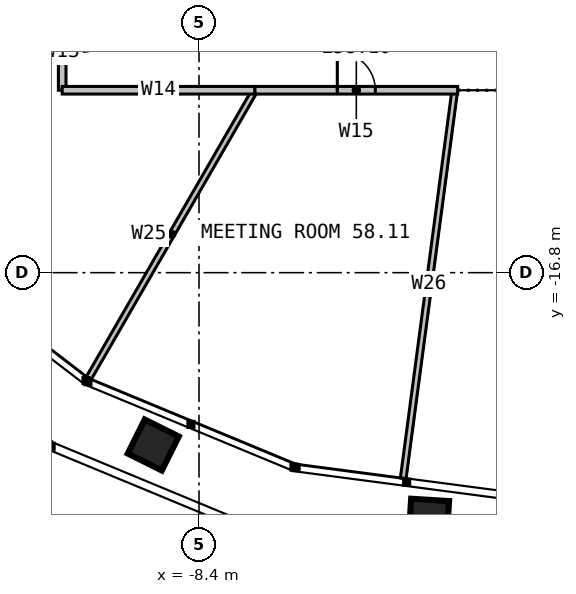
"""IFC4 building model, lengths in metres.
Left out: names, types, materials, properties, quantities, classifications, styles, units other than length and angle.
Written with IfcOpenShell. Run it as: python <this file> out.ifc"""

import sys

from ifc_helpers import new_model, si_unit, direction, frame, frame_2d, origin, place, context, subcontext, project, spatial, rectangle, extrude, element, fill, save


model = new_model("IFC4")
c1 = context("Model", 3, precision=1e-05, world=origin(), true_north=direction((0.0, 1.0)))
c2 = subcontext(c1, "Body", "Model", "MODEL_VIEW")
j1 = project(units=[si_unit("LENGTHUNIT", "METRE"), si_unit("PLANEANGLEUNIT", "RADIAN")], contexts=[c1])
p1 = place(None, origin())
s1 = spatial("IfcSite", under=j1, at=p1, CompositionType="ELEMENT")
p2 = place(p1, origin())
s2 = spatial("IfcBuilding", under=s1, at=p2, CompositionType="ELEMENT")
p3 = place(p2, frame((0.0, 0.0, 240.0)))
s3 = spatial("IfcBuildingStorey", under=s2, at=p3, CompositionType="ELEMENT", Elevation=240.0)
p4 = place(p3, frame((-6.928, -12.0, 0.0), z_axis=(0.0, 0.0, 1.0), x_axis=(-0.500008971228, -0.866020224182, 0.0)))
e1 = element("IfcWall", 1, at=p4, inside=s3, PredefinedType="PARTITIONING", context=c2, shape_type="SweptSolid", body=[
    extrude(rectangle(XDim=8.753, YDim=0.15, at=frame_2d((4.376, 0.0))), origin(), (0.0, 0.0, 1.0), 2.79),
])
p5 = place(p3, frame((-1.669, -11.99, 0.0), z_axis=(0.0, 0.0, 1.0), x_axis=(-0.131704595197, -0.991289009121, 0.0)))
e2 = element("IfcWall", 2, at=p5, inside=s3, PredefinedType="PARTITIONING", context=c2, shape_type="SweptSolid", body=[
    extrude(rectangle(XDim=10.31, YDim=0.15, at=frame_2d((5.155, 0.0))), origin(), (0.0, 0.0, 1.0), 2.79),
])
p6 = place(p3, frame((-12.0, -10.0, 0.0), z_axis=(0.0, 0.0, 1.0), x_axis=(0.0, -1.0, 0.0)))
e3 = element("IfcWall", 3, at=p6, inside=s3, PredefinedType="PARTITIONING", context=c2, shape_type="SweptSolid", body=[
    extrude(rectangle(XDim=2.0, YDim=0.2, at=frame_2d((1.0, 0.0))), origin(), (0.0, 0.0, 1.0), 3.8),
])
p7 = place(p3, frame((-12.0, -12.0, 0.0), z_axis=(0.0, 0.0, 1.0), x_axis=(1.0, 0.0, 0.0)))
e4 = element("IfcWall", 4, at=p7, inside=s3, PredefinedType="PARTITIONING", context=c2, shape_type="SweptSolid", body=[
    extrude(rectangle(XDim=5.072, YDim=0.2, at=frame_2d((2.536, 0.0))), origin(), (0.0, 0.0, 1.0), 3.8),
])
p8 = place(p3, frame((-6.928, -12.0, 0.0), z_axis=(0.0, 0.0, 1.0), x_axis=(1.0, 0.0, 0.0)))
e5 = element("IfcWall", 5, at=p8, inside=s3, PredefinedType="PARTITIONING", context=c2, shape_type="SweptSolid", body=[
    extrude(rectangle(XDim=5.334, YDim=0.2, at=frame_2d((2.667, 0.0))), origin(), (0.0, 0.0, 1.0), 3.8),
])
p9 = place(p8, frame((2.167, 0.0, 0.0)))
e6 = element("IfcOpeningElement", 6, at=p9, cuts=e5, PredefinedType="OPENING", context=c2, shape_type="SweptSolid", body=[
    extrude(rectangle(XDim=1.0, YDim=2.2, at=frame_2d((0.5, 1.1))), frame((0.0, 0.11, 0.0), z_axis=(0.0, -1.0, 0.0), x_axis=(1.0, 0.0, 0.0)), (0.0, 0.0, 1.0), 0.22),
])
p10 = place(p9, origin())
e7 = element("IfcDoor", 7, at=p10, inside=s3, OperationType="SINGLE_SWING_LEFT", PredefinedType="DOOR", context=c2, shape_type="SweptSolid", body=[
    extrude(rectangle(XDim=1.0, YDim=2.2, at=frame_2d((0.5, 1.1))), frame((0.0, 0.025, 0.0), z_axis=(0.0, -1.0, 0.0), x_axis=(1.0, 0.0, 0.0)), (0.0, 0.0, 1.0), 0.05),
])
fill(e6, e7)
save(model, sys.argv[1])
